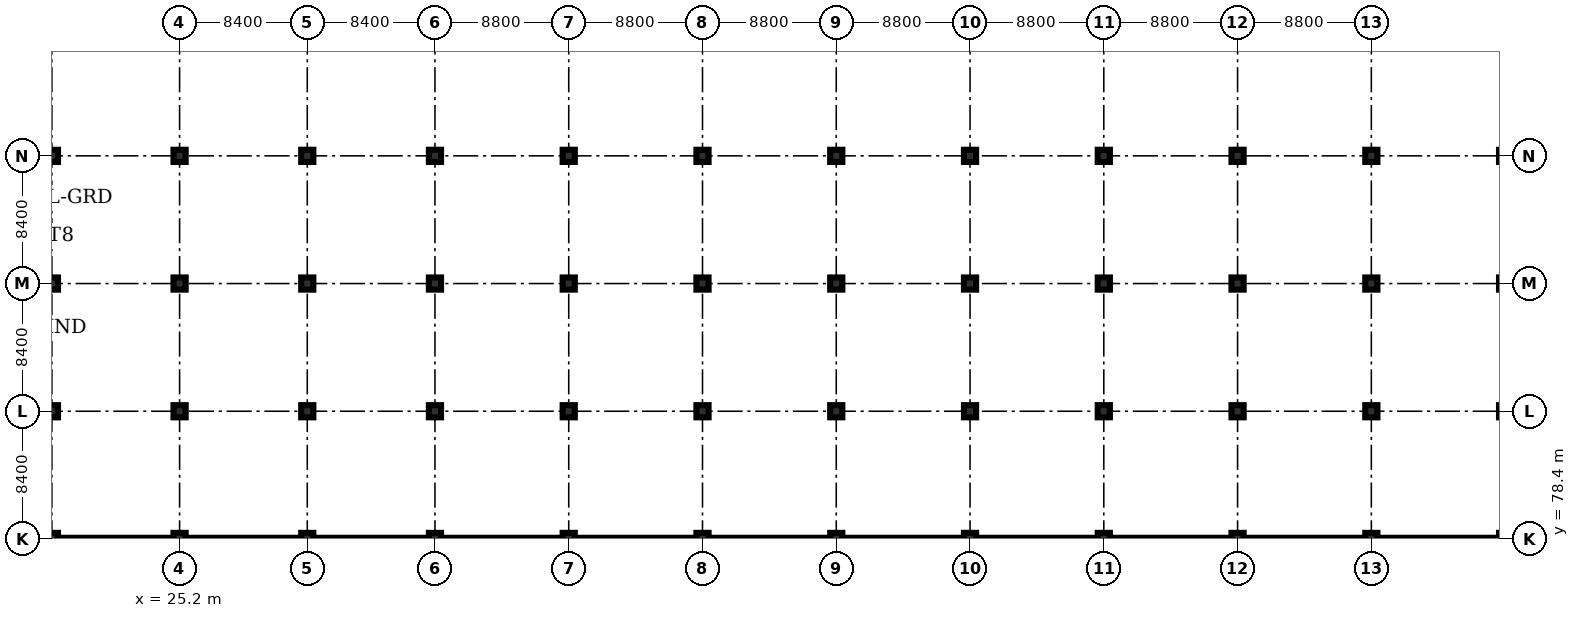
"""IFC4 building model, lengths in metres.
Left out: names, types, materials, properties, quantities, classifications, styles, units other than length and angle.
Written with IfcOpenShell. Run it as: python <this file> out.ifc"""

import sys

from ifc_helpers import new_model, si_unit, direction, frame, frame_2d, origin, origin_2d, place, context, subcontext, project, spatial, rectangle, extrude, element, save


model = new_model("IFC4")
c1 = context("Model", 3, precision=1e-05, world=origin(), true_north=direction((0.0, 1.0)))
c2 = subcontext(c1, "Body", "Model", "MODEL_VIEW")
j1 = project(units=[si_unit("LENGTHUNIT", "METRE"), si_unit("PLANEANGLEUNIT", "RADIAN")], contexts=[c1])
p1 = place(None, origin())
s1 = spatial("IfcSite", under=j1, at=p1, CompositionType="ELEMENT")
p2 = place(p1, origin())
s2 = spatial("IfcBuilding", under=s1, at=p2, CompositionType="ELEMENT")
p3 = place(p2, frame((0.0, 0.0, -9.6)))
s3 = spatial("IfcBuildingStorey", under=s2, at=p3, CompositionType="ELEMENT", Elevation=-9.6)
for number, where, z_axis, x_axis in (
    (1, (16.8, 78.4, 0.0), (0.0, 0.0, 1.0), (1.0, 0.0, 0.0)),
    (2, (16.8, 86.8, 0.0), (0.0, 0.0, 1.0), (1.0, 0.0, 0.0)),
    (3, (16.8, 95.2, 0.0), (0.0, 0.0, 1.0), (1.0, 0.0, 0.0)),
    (4, (16.8, 103.6, 0.0), (0.0, 0.0, 1.0), (1.0, 0.0, 0.0)),
    (5, (25.2, 78.4, 0.0), (0.0, 0.0, 1.0), (1.0, 0.0, 0.0)),
    (6, (25.2, 86.8, 0.0), (0.0, 0.0, 1.0), (1.0, 0.0, 0.0)),
    (7, (25.2, 95.2, 0.0), (0.0, 0.0, 1.0), (1.0, 0.0, 0.0)),
    (8, (25.2, 103.6, 0.0), (0.0, 0.0, 1.0), (1.0, 0.0, 0.0)),
    (9, (33.6, 78.4, 0.0), (0.0, 0.0, 1.0), (1.0, 0.0, 0.0)),
    (10, (33.6, 86.8, 0.0), (0.0, 0.0, 1.0), (1.0, 0.0, 0.0)),
    (11, (33.6, 95.2, 0.0), (0.0, 0.0, 1.0), (1.0, 0.0, 0.0)),
    (12, (33.6, 103.6, 0.0), (0.0, 0.0, 1.0), (1.0, 0.0, 0.0)),
    (13, (42.0, 78.4, 0.0), (0.0, 0.0, 1.0), (1.0, 0.0, 0.0)),
    (14, (42.0, 86.8, 0.0), (0.0, 0.0, 1.0), (1.0, 0.0, 0.0)),
    (15, (42.0, 95.2, 0.0), (0.0, 0.0, 1.0), (1.0, 0.0, 0.0)),
    (16, (42.0, 103.6, 0.0), (0.0, 0.0, 1.0), (1.0, 0.0, 0.0)),
    (17, (50.8, 78.4, 0.0), (0.0, 0.0, 1.0), (1.0, 0.0, 0.0)),
    (18, (50.8, 86.8, 0.0), (0.0, 0.0, 1.0), (1.0, 0.0, 0.0)),
    (19, (50.8, 95.2, 0.0), (0.0, 0.0, 1.0), (1.0, 0.0, 0.0)),
    (20, (50.8, 103.6, 0.0), (0.0, 0.0, 1.0), (1.0, 0.0, 0.0)),
    (21, (59.6, 78.4, 0.0), (0.0, 0.0, 1.0), (1.0, 0.0, 0.0)),
    (22, (59.6, 86.8, 0.0), (0.0, 0.0, 1.0), (1.0, 0.0, 0.0)),
    (23, (59.6, 95.2, 0.0), (0.0, 0.0, 1.0), (1.0, 0.0, 0.0)),
    (24, (59.6, 103.6, 0.0), (0.0, 0.0, 1.0), (1.0, 0.0, 0.0)),
    (25, (68.4, 78.4, 0.0), (0.0, 0.0, 1.0), (1.0, 0.0, 0.0)),
    (26, (68.4, 86.8, 0.0), (0.0, 0.0, 1.0), (1.0, 0.0, 0.0)),
    (27, (68.4, 95.2, 0.0), (0.0, 0.0, 1.0), (1.0, 0.0, 0.0)),
    (28, (68.4, 103.6, 0.0), (0.0, 0.0, 1.0), (1.0, 0.0, 0.0)),
    (29, (77.2, 78.4, 0.0), (0.0, 0.0, 1.0), (1.0, 0.0, 0.0)),
    (30, (77.2, 86.8, 0.0), (0.0, 0.0, 1.0), (1.0, 0.0, 0.0)),
    (31, (77.2, 95.2, 0.0), (0.0, 0.0, 1.0), (1.0, 0.0, 0.0)),
    (32, (77.2, 103.6, 0.0), (0.0, 0.0, 1.0), (1.0, 0.0, 0.0)),
    (33, (86.0, 78.4, 0.0), (0.0, 0.0, 1.0), (1.0, 0.0, 0.0)),
    (34, (86.0, 86.8, 0.0), (0.0, 0.0, 1.0), (1.0, 0.0, 0.0)),
    (35, (86.0, 95.2, 0.0), (0.0, 0.0, 1.0), (1.0, 0.0, 0.0)),
    (36, (86.0, 103.6, 0.0), (0.0, 0.0, 1.0), (1.0, 0.0, 0.0)),
    (37, (94.8, 78.4, 0.0), (0.0, 0.0, 1.0), (1.0, 0.0, 0.0)),
    (38, (94.8, 86.8, 0.0), (0.0, 0.0, 1.0), (1.0, 0.0, 0.0)),
    (39, (94.8, 95.2, 0.0), (0.0, 0.0, 1.0), (1.0, 0.0, 0.0)),
    (40, (94.8, 103.6, 0.0), (0.0, 0.0, 1.0), (1.0, 0.0, 0.0)),
    (41, (103.6, 78.4, 0.0), (0.0, 0.0, 1.0), (1.0, 0.0, 0.0)),
    (42, (103.6, 86.8, 0.0), (0.0, 0.0, 1.0), (1.0, 0.0, 0.0)),
    (43, (103.6, 95.2, 0.0), (0.0, 0.0, 1.0), (1.0, 0.0, 0.0)),
    (44, (103.6, 103.6, 0.0), (0.0, 0.0, 1.0), (1.0, 0.0, 0.0)),
    (45, (112.4, 78.4, 0.0), (0.0, 0.0, 1.0), (1.0, 0.0, 0.0)),
    (46, (112.4, 86.8, 0.0), (0.0, 0.0, 1.0), (1.0, 0.0, 0.0)),
    (47, (112.4, 95.2, 0.0), (0.0, 0.0, 1.0), (1.0, 0.0, 0.0)),
    (48, (112.4, 103.6, 0.0), (0.0, 0.0, 1.0), (1.0, 0.0, 0.0)),
):
    element("IfcColumn", number, at=place(p3, frame(where, z_axis=z_axis, x_axis=x_axis)), inside=s3, PredefinedType="COLUMN", context=c2, shape_type="SweptSolid", body=[
        extrude(rectangle(XDim=0.8, YDim=0.8, at=origin_2d()), origin(), (0.0, 0.0, 1.0), 4.48),
    ])
p4 = place(p3, frame((0.26, 78.25, 0.0), z_axis=(0.0, 0.0, 1.0), x_axis=(1.0, 0.0, 0.0)))
e49 = element("IfcWall", 49, at=p4, inside=s3, PredefinedType="SHEAR", context=c2, shape_type="SweptSolid", body=[
    extrude(rectangle(XDim=138.39, YDim=0.45, at=frame_2d((69.195, 0.0))), origin(), (0.0, 0.0, 1.0), 3.7),
])
save(model, sys.argv[1])
